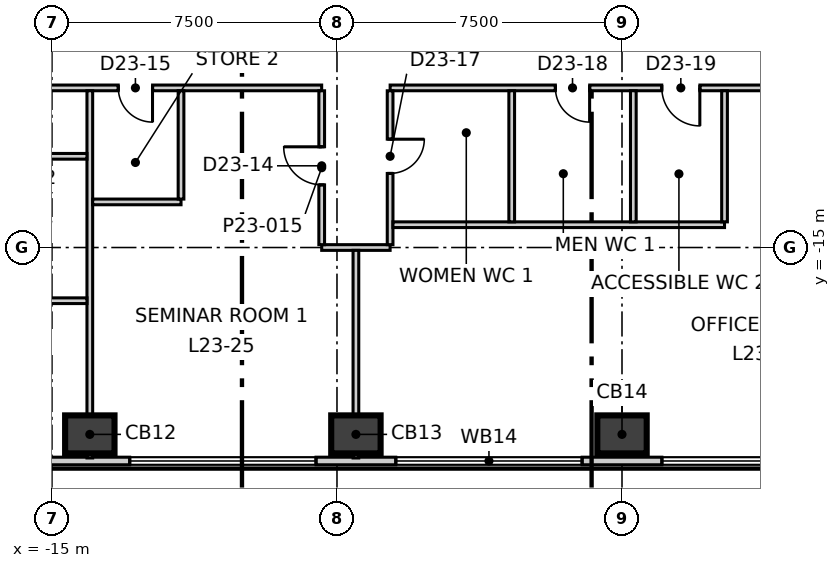
"""IFC4 building model, lengths in metres.
Left out: names, types, materials, properties, quantities, classifications, styles, units other than length and angle.
Written with IfcOpenShell. Run it as: python <this file> out.ifc"""

import sys

from ifc_helpers import new_model, si_unit, direction, frame, frame_2d, origin, origin_2d, place, context, subcontext, project, spatial, rectangle, extrude, element, fill, save


model = new_model("IFC4")
c1 = context("Model", 3, precision=1e-05, world=origin(), true_north=direction((0.0, 1.0)))
c2 = subcontext(c1, "Body", "Model", "MODEL_VIEW")
j1 = project(units=[si_unit("LENGTHUNIT", "METRE"), si_unit("PLANEANGLEUNIT", "RADIAN")], contexts=[c1])
p1 = place(None, origin())
s1 = spatial("IfcSite", under=j1, at=p1, CompositionType="ELEMENT")
p2 = place(p1, origin())
s2 = spatial("IfcBuilding", under=s1, at=p2, CompositionType="ELEMENT")
p3 = place(p2, frame((0.0, 0.0, 104.3)))
s3 = spatial("IfcBuildingStorey", under=s2, at=p3, CompositionType="ELEMENT", Elevation=104.3)
for number, where, z_axis, x_axis in (
    (1, (-14.004, -19.917, -0.3), (0.0, 0.0, 1.0), (1.0, 0.0, 0.0)),
    (2, (-7.002, -19.917, -0.3), (0.0, 0.0, 1.0), (1.0, 0.0, 0.0)),
    (3, (0.0, -19.917, -0.3), (0.0, 0.0, 1.0), (1.0, 0.0, 0.0)),
):
    element("IfcColumn", number, at=place(p3, frame(where, z_axis=z_axis, x_axis=x_axis)), inside=s3, PredefinedType="COLUMN", context=c2, shape_type="SweptSolid", body=[
        extrude(rectangle(XDim=1.3, YDim=1.0, at=origin_2d()), origin(), (0.0, 0.0, 1.0), 4.0),
    ])
p4 = place(p3, frame((-3.2, 35.691, 0.0), z_axis=(0.0, 0.0, 1.0), x_axis=(-0.500010127185, -0.866019556773, 0.0)))
e4 = element("IfcWall", 4, at=p4, inside=s3, PredefinedType="ELEMENTEDWALL", context=c2, shape_type="SweptSolid", body=[
    extrude(rectangle(XDim=58.599, YDim=0.2, at=frame_2d((29.299, 0.0))), origin(), (0.0, 0.0, 1.0), 3.7),
])
p5 = place(p4, frame((2.353, 0.0, 0.9)))
e5 = element("IfcOpeningElement", 5, at=p5, cuts=e4, PredefinedType="OPENING", context=c2, shape_type="SweptSolid", body=[
    extrude(rectangle(XDim=4.9, YDim=2.5, at=frame_2d((2.45, 1.25))), frame((0.0, 0.11, 0.0), z_axis=(0.0, -1.0, 0.0), x_axis=(1.0, 0.0, 0.0)), (0.0, 0.0, 1.0), 0.22),
])
p6 = place(p4, frame((9.355, 0.0, 0.9)))
e6 = element("IfcOpeningElement", 6, at=p6, cuts=e4, PredefinedType="OPENING", context=c2, shape_type="SweptSolid", body=[
    extrude(rectangle(XDim=4.9, YDim=2.5, at=frame_2d((2.45, 1.25))), frame((0.0, 0.11, 0.0), z_axis=(0.0, -1.0, 0.0), x_axis=(1.0, 0.0, 0.0)), (0.0, 0.0, 1.0), 0.22),
])
p7 = place(p4, frame((16.357, 0.0, 0.9)))
e7 = element("IfcOpeningElement", 7, at=p7, cuts=e4, PredefinedType="OPENING", context=c2, shape_type="SweptSolid", body=[
    extrude(rectangle(XDim=4.9, YDim=2.5, at=frame_2d((2.45, 1.25))), frame((0.0, 0.11, 0.0), z_axis=(0.0, -1.0, 0.0), x_axis=(1.0, 0.0, 0.0)), (0.0, 0.0, 1.0), 0.22),
])
p8 = place(p4, frame((23.358, 0.0, 0.9)))
e8 = element("IfcOpeningElement", 8, at=p8, cuts=e4, PredefinedType="OPENING", context=c2, shape_type="SweptSolid", body=[
    extrude(rectangle(XDim=4.9, YDim=2.5, at=frame_2d((2.45, 1.25))), frame((0.0, 0.11, 0.0), z_axis=(0.0, -1.0, 0.0), x_axis=(1.0, 0.0, 0.0)), (0.0, 0.0, 1.0), 0.22),
])
p9 = place(p4, frame((30.36, 0.0, 0.9)))
e9 = element("IfcOpeningElement", 9, at=p9, cuts=e4, PredefinedType="OPENING", context=c2, shape_type="SweptSolid", body=[
    extrude(rectangle(XDim=4.9, YDim=2.5, at=frame_2d((2.45, 1.25))), frame((0.0, 0.11, 0.0), z_axis=(0.0, -1.0, 0.0), x_axis=(1.0, 0.0, 0.0)), (0.0, 0.0, 1.0), 0.22),
])
p10 = place(p4, frame((37.362, 0.0, 0.9)))
e10 = element("IfcOpeningElement", 10, at=p10, cuts=e4, PredefinedType="OPENING", context=c2, shape_type="SweptSolid", body=[
    extrude(rectangle(XDim=4.9, YDim=2.5, at=frame_2d((2.45, 1.25))), frame((0.0, 0.11, 0.0), z_axis=(0.0, -1.0, 0.0), x_axis=(1.0, 0.0, 0.0)), (0.0, 0.0, 1.0), 0.22),
])
p11 = place(p4, frame((44.363, 0.0, 0.9)))
e11 = element("IfcOpeningElement", 11, at=p11, cuts=e4, PredefinedType="OPENING", context=c2, shape_type="SweptSolid", body=[
    extrude(rectangle(XDim=4.9, YDim=2.5, at=frame_2d((2.45, 1.25))), frame((0.0, 0.11, 0.0), z_axis=(0.0, -1.0, 0.0), x_axis=(1.0, 0.0, 0.0)), (0.0, 0.0, 1.0), 0.22),
])
p12 = place(p4, frame((51.365, 0.0, 0.9)))
e12 = element("IfcOpeningElement", 12, at=p12, cuts=e4, PredefinedType="OPENING", context=c2, shape_type="SweptSolid", body=[
    extrude(rectangle(XDim=4.9, YDim=2.5, at=frame_2d((2.45, 1.25))), frame((0.0, 0.11, 0.0), z_axis=(0.0, -1.0, 0.0), x_axis=(1.0, 0.0, 0.0)), (0.0, 0.0, 1.0), 0.22),
])
p13 = place(p3, frame((-29.31, -20.617, 0.0), z_axis=(0.0, 0.0, 1.0), x_axis=(1.0, 0.0, 0.0)))
e13 = element("IfcWall", 13, at=p13, inside=s3, PredefinedType="ELEMENTEDWALL", context=c2, shape_type="SweptSolid", body=[
    extrude(rectangle(XDim=58.6, YDim=0.2, at=frame_2d((29.3, 0.0))), origin(), (0.0, 0.0, 1.0), 3.7),
])
p14 = place(p13, frame((2.354, 0.0, 0.9)))
e14 = element("IfcOpeningElement", 14, at=p14, cuts=e13, PredefinedType="OPENING", context=c2, shape_type="SweptSolid", body=[
    extrude(rectangle(XDim=4.9, YDim=2.5, at=frame_2d((2.45, 1.25))), frame((0.0, 0.11, 0.0), z_axis=(0.0, -1.0, 0.0), x_axis=(1.0, 0.0, 0.0)), (0.0, 0.0, 1.0), 0.22),
])
p15 = place(p13, frame((9.356, 0.0, 0.9)))
e15 = element("IfcOpeningElement", 15, at=p15, cuts=e13, PredefinedType="OPENING", context=c2, shape_type="SweptSolid", body=[
    extrude(rectangle(XDim=4.9, YDim=2.5, at=frame_2d((2.45, 1.25))), frame((0.0, 0.11, 0.0), z_axis=(0.0, -1.0, 0.0), x_axis=(1.0, 0.0, 0.0)), (0.0, 0.0, 1.0), 0.22),
])
p16 = place(p13, frame((16.357, 0.0, 0.9)))
e16 = element("IfcOpeningElement", 16, at=p16, cuts=e13, PredefinedType="OPENING", context=c2, shape_type="SweptSolid", body=[
    extrude(rectangle(XDim=4.9, YDim=2.5, at=frame_2d((2.45, 1.25))), frame((0.0, 0.11, 0.0), z_axis=(0.0, -1.0, 0.0), x_axis=(1.0, 0.0, 0.0)), (0.0, 0.0, 1.0), 0.22),
])
p17 = place(p13, frame((23.359, 0.0, 0.9)))
e17 = element("IfcOpeningElement", 17, at=p17, cuts=e13, PredefinedType="OPENING", context=c2, shape_type="SweptSolid", body=[
    extrude(rectangle(XDim=4.9, YDim=2.5, at=frame_2d((2.45, 1.25))), frame((0.0, 0.11, 0.0), z_axis=(0.0, -1.0, 0.0), x_axis=(1.0, 0.0, 0.0)), (0.0, 0.0, 1.0), 0.22),
])
p18 = place(p13, frame((30.361, 0.0, 0.9)))
e18 = element("IfcOpeningElement", 18, at=p18, cuts=e13, PredefinedType="OPENING", context=c2, shape_type="SweptSolid", body=[
    extrude(rectangle(XDim=4.9, YDim=2.5, at=frame_2d((2.45, 1.25))), frame((0.0, 0.11, 0.0), z_axis=(0.0, -1.0, 0.0), x_axis=(1.0, 0.0, 0.0)), (0.0, 0.0, 1.0), 0.22),
])
p19 = place(p13, frame((37.363, 0.0, 0.9)))
e19 = element("IfcOpeningElement", 19, at=p19, cuts=e13, PredefinedType="OPENING", context=c2, shape_type="SweptSolid", body=[
    extrude(rectangle(XDim=4.9, YDim=2.5, at=frame_2d((2.45, 1.25))), frame((0.0, 0.11, 0.0), z_axis=(0.0, -1.0, 0.0), x_axis=(1.0, 0.0, 0.0)), (0.0, 0.0, 1.0), 0.22),
])
p20 = place(p13, frame((44.364, 0.0, 0.9)))
e20 = element("IfcOpeningElement", 20, at=p20, cuts=e13, PredefinedType="OPENING", context=c2, shape_type="SweptSolid", body=[
    extrude(rectangle(XDim=4.9, YDim=2.5, at=frame_2d((2.45, 1.25))), frame((0.0, 0.11, 0.0), z_axis=(0.0, -1.0, 0.0), x_axis=(1.0, 0.0, 0.0)), (0.0, 0.0, 1.0), 0.22),
])
p21 = place(p13, frame((51.366, 0.0, 0.9)))
e21 = element("IfcOpeningElement", 21, at=p21, cuts=e13, PredefinedType="OPENING", context=c2, shape_type="SweptSolid", body=[
    extrude(rectangle(XDim=4.9, YDim=2.5, at=frame_2d((2.45, 1.25))), frame((0.0, 0.11, 0.0), z_axis=(0.0, -1.0, 0.0), x_axis=(1.0, 0.0, 0.0)), (0.0, 0.0, 1.0), 0.22),
])
p22 = place(p3, frame((32.51, -15.074, 0.0), z_axis=(0.0, 0.0, 1.0), x_axis=(-0.500008323105, 0.866020598384, 0.0)))
e22 = element("IfcWall", 22, at=p22, inside=s3, PredefinedType="ELEMENTEDWALL", context=c2, shape_type="SweptSolid", body=[
    extrude(rectangle(XDim=58.599, YDim=0.2, at=frame_2d((29.3, 0.0))), origin(), (0.0, 0.0, 1.0), 3.7),
])
p23 = place(p22, frame((2.354, 0.0, 0.9)))
e23 = element("IfcOpeningElement", 23, at=p23, cuts=e22, PredefinedType="OPENING", context=c2, shape_type="SweptSolid", body=[
    extrude(rectangle(XDim=4.9, YDim=2.5, at=frame_2d((2.45, 1.25))), frame((0.0, 0.11, 0.0), z_axis=(0.0, -1.0, 0.0), x_axis=(1.0, 0.0, 0.0)), (0.0, 0.0, 1.0), 0.22),
])
p24 = place(p22, frame((9.355, 0.0, 0.9)))
e24 = element("IfcOpeningElement", 24, at=p24, cuts=e22, PredefinedType="OPENING", context=c2, shape_type="SweptSolid", body=[
    extrude(rectangle(XDim=4.9, YDim=2.5, at=frame_2d((2.45, 1.25))), frame((0.0, 0.11, 0.0), z_axis=(0.0, -1.0, 0.0), x_axis=(1.0, 0.0, 0.0)), (0.0, 0.0, 1.0), 0.22),
])
p25 = place(p22, frame((16.357, 0.0, 0.9)))
e25 = element("IfcOpeningElement", 25, at=p25, cuts=e22, PredefinedType="OPENING", context=c2, shape_type="SweptSolid", body=[
    extrude(rectangle(XDim=4.9, YDim=2.5, at=frame_2d((2.45, 1.25))), frame((0.0, 0.11, 0.0), z_axis=(0.0, -1.0, 0.0), x_axis=(1.0, 0.0, 0.0)), (0.0, 0.0, 1.0), 0.22),
])
p26 = place(p22, frame((23.359, 0.0, 0.9)))
e26 = element("IfcOpeningElement", 26, at=p26, cuts=e22, PredefinedType="OPENING", context=c2, shape_type="SweptSolid", body=[
    extrude(rectangle(XDim=4.9, YDim=2.5, at=frame_2d((2.45, 1.25))), frame((0.0, 0.11, 0.0), z_axis=(0.0, -1.0, 0.0), x_axis=(1.0, 0.0, 0.0)), (0.0, 0.0, 1.0), 0.22),
])
p27 = place(p22, frame((30.36, 0.0, 0.9)))
e27 = element("IfcOpeningElement", 27, at=p27, cuts=e22, PredefinedType="OPENING", context=c2, shape_type="SweptSolid", body=[
    extrude(rectangle(XDim=4.9, YDim=2.5, at=frame_2d((2.45, 1.25))), frame((0.0, 0.11, 0.0), z_axis=(0.0, -1.0, 0.0), x_axis=(1.0, 0.0, 0.0)), (0.0, 0.0, 1.0), 0.22),
])
p28 = place(p22, frame((37.362, 0.0, 0.9)))
e28 = element("IfcOpeningElement", 28, at=p28, cuts=e22, PredefinedType="OPENING", context=c2, shape_type="SweptSolid", body=[
    extrude(rectangle(XDim=4.9, YDim=2.5, at=frame_2d((2.45, 1.25))), frame((0.0, 0.11, 0.0), z_axis=(0.0, -1.0, 0.0), x_axis=(1.0, 0.0, 0.0)), (0.0, 0.0, 1.0), 0.22),
])
p29 = place(p22, frame((44.364, 0.0, 0.9)))
e29 = element("IfcOpeningElement", 29, at=p29, cuts=e22, PredefinedType="OPENING", context=c2, shape_type="SweptSolid", body=[
    extrude(rectangle(XDim=4.9, YDim=2.5, at=frame_2d((2.45, 1.25))), frame((0.0, 0.11, 0.0), z_axis=(0.0, -1.0, 0.0), x_axis=(1.0, 0.0, 0.0)), (0.0, 0.0, 1.0), 0.22),
])
p30 = place(p22, frame((51.365, 0.0, 0.9)))
e30 = element("IfcOpeningElement", 30, at=p30, cuts=e22, PredefinedType="OPENING", context=c2, shape_type="SweptSolid", body=[
    extrude(rectangle(XDim=4.9, YDim=2.5, at=frame_2d((2.45, 1.25))), frame((0.0, 0.11, 0.0), z_axis=(0.0, -1.0, 0.0), x_axis=(1.0, 0.0, 0.0)), (0.0, 0.0, 1.0), 0.22),
])
p31 = place(p3, frame((-18.556, -10.8, 0.0), z_axis=(0.0, 0.0, 1.0), x_axis=(1.0, 0.0, 0.0)))
e31 = element("IfcWall", 31, at=p31, inside=s3, PredefinedType="PARTITIONING", context=c2, shape_type="SweptSolid", body=[
    extrude(rectangle(XDim=10.653, YDim=0.15, at=frame_2d((5.326, 0.0))), origin(), (0.0, 0.0, 1.0), 3.7),
])
p32 = place(p31, frame((1.7, 0.0, 0.0)))
e32 = element("IfcOpeningElement", 32, at=p32, cuts=e31, PredefinedType="OPENING", context=c2, shape_type="SweptSolid", body=[
    extrude(rectangle(XDim=1.1, YDim=2.1, at=frame_2d((0.55, 1.05))), frame((0.0, 0.085, 0.0), z_axis=(0.0, -1.0, 0.0), x_axis=(1.0, 0.0, 0.0)), (0.0, 0.0, 1.0), 0.17),
])
p33 = place(p31, frame((5.302, 0.0, 0.0)))
e33 = element("IfcOpeningElement", 33, at=p33, cuts=e31, PredefinedType="OPENING", context=c2, shape_type="SweptSolid", body=[
    extrude(rectangle(XDim=0.9, YDim=2.1, at=frame_2d((0.45, 1.05))), frame((0.0, 0.085, 0.0), z_axis=(0.0, -1.0, 0.0), x_axis=(1.0, 0.0, 0.0)), (0.0, 0.0, 1.0), 0.17),
])
p34 = place(p3, frame((-6.101, -10.8, 0.0), z_axis=(0.0, 0.0, 1.0), x_axis=(1.0, 0.0, 0.0)))
e34 = element("IfcWall", 34, at=p34, inside=s3, PredefinedType="PARTITIONING", context=c2, shape_type="SweptSolid", body=[
    extrude(rectangle(XDim=24.807, YDim=0.15, at=frame_2d((12.404, 0.0))), origin(), (0.0, 0.0, 1.0), 3.7),
])
p35 = place(p34, frame((10.449, 0.0, 0.0)))
e35 = element("IfcOpeningElement", 35, at=p35, cuts=e34, PredefinedType="OPENING", context=c2, shape_type="SweptSolid", body=[
    extrude(rectangle(XDim=1.1, YDim=2.1, at=frame_2d((0.55, 1.05))), frame((0.0, 0.085, 0.0), z_axis=(0.0, -1.0, 0.0), x_axis=(1.0, 0.0, 0.0)), (0.0, 0.0, 1.0), 0.17),
])
p36 = place(p34, frame((4.349, 0.0, 0.0)))
e36 = element("IfcOpeningElement", 36, at=p36, cuts=e34, PredefinedType="OPENING", context=c2, shape_type="SweptSolid", body=[
    extrude(rectangle(XDim=0.9, YDim=2.1, at=frame_2d((0.45, 1.05))), frame((0.0, 0.085, 0.0), z_axis=(0.0, -1.0, 0.0), x_axis=(1.0, 0.0, 0.0)), (0.0, 0.0, 1.0), 0.17),
])
p37 = place(p34, frame((7.149, 0.0, 0.0)))
e37 = element("IfcOpeningElement", 37, at=p37, cuts=e34, PredefinedType="OPENING", context=c2, shape_type="SweptSolid", body=[
    extrude(rectangle(XDim=1.0, YDim=2.1, at=frame_2d((0.5, 1.05))), frame((0.0, 0.085, 0.0), z_axis=(0.0, -1.0, 0.0), x_axis=(1.0, 0.0, 0.0)), (0.0, 0.0, 1.0), 0.17),
])
p38 = place(p34, frame((18.453, 0.0, 0.0)))
e38 = element("IfcOpeningElement", 38, at=p38, cuts=e34, PredefinedType="OPENING", context=c2, shape_type="SweptSolid", body=[
    extrude(rectangle(XDim=1.1, YDim=2.1, at=frame_2d((0.55, 1.05))), frame((0.0, 0.085, 0.0), z_axis=(0.0, -1.0, 0.0), x_axis=(1.0, 0.0, 0.0)), (0.0, 0.0, 1.0), 0.17),
])
p39 = place(p3, frame((-18.631, -10.669, 0.0), z_axis=(0.0, 0.0, 1.0), x_axis=(0.500015596868, 0.866016398741, 0.0)))
e39 = element("IfcWall", 39, at=p39, inside=s3, PredefinedType="PARTITIONING", context=c2, shape_type="SweptSolid", body=[
    extrude(rectangle(XDim=24.656, YDim=0.15, at=frame_2d((12.328, 0.0))), origin(), (0.0, 0.0, 1.0), 3.7),
])
p40 = place(p39, frame((17.507, 0.0, 0.0)))
e40 = element("IfcOpeningElement", 40, at=p40, cuts=e39, PredefinedType="OPENING", context=c2, shape_type="SweptSolid", body=[
    extrude(rectangle(XDim=1.1, YDim=2.1, at=frame_2d((0.55, 1.05))), frame((0.0, 0.085, 0.0), z_axis=(0.0, -1.0, 0.0), x_axis=(1.0, 0.0, 0.0)), (0.0, 0.0, 1.0), 0.17),
])
p41 = place(p39, frame((5.104, 0.0, 0.0)))
e41 = element("IfcOpeningElement", 41, at=p41, cuts=e39, PredefinedType="OPENING", context=c2, shape_type="SweptSolid", body=[
    extrude(rectangle(XDim=1.1, YDim=2.1, at=frame_2d((0.55, 1.05))), frame((0.0, 0.085, 0.0), z_axis=(0.0, -1.0, 0.0), x_axis=(1.0, 0.0, 0.0)), (0.0, 0.0, 1.0), 0.17),
])
p42 = place(p3, frame((-14.004, -20.537, 0.0), z_axis=(0.0, 0.0, 1.0), x_axis=(0.0, 1.0, 0.0)))
e42 = element("IfcWall", 42, at=p42, inside=s3, PredefinedType="PARTITIONING", context=c2, shape_type="SweptSolid", body=[
    extrude(rectangle(XDim=9.662, YDim=0.15, at=frame_2d((4.831, 0.0))), origin(), (0.0, 0.0, 1.0), 3.7),
])
p43 = place(p3, frame((-13.929, -13.8, 0.0), z_axis=(0.0, 0.0, 1.0), x_axis=(1.0, 0.0, 0.0)))
e43 = element("IfcWall", 43, at=p43, inside=s3, PredefinedType="PARTITIONING", context=c2, shape_type="SweptSolid", body=[
    extrude(rectangle(XDim=2.325, YDim=0.15, at=frame_2d((1.163, 0.0))), origin(), (0.0, 0.0, 1.0), 3.7),
])
p44 = place(p3, frame((-11.604, -13.725, 0.0), z_axis=(0.0, 0.0, 1.0), x_axis=(0.0, 1.0, 0.0)))
e44 = element("IfcWall", 44, at=p44, inside=s3, PredefinedType="PARTITIONING", context=c2, shape_type="SweptSolid", body=[
    extrude(rectangle(XDim=2.85, YDim=0.15, at=frame_2d((1.425, 0.0))), origin(), (0.0, 0.0, 1.0), 3.7),
])
p45 = place(p3, frame((-7.902, -15.0, 0.0), z_axis=(0.0, 0.0, 1.0), x_axis=(1.0, 0.0, 0.0)))
e45 = element("IfcWall", 45, at=p45, inside=s3, PredefinedType="PARTITIONING", context=c2, shape_type="SweptSolid", body=[
    extrude(rectangle(XDim=1.8, YDim=0.15, at=frame_2d((0.9, 0.0))), origin(), (0.0, 0.0, 1.0), 3.7),
])
p46 = place(p3, frame((-7.902, -14.925, 0.0), z_axis=(0.0, 0.0, 1.0), x_axis=(0.0, 1.0, 0.0)))
e46 = element("IfcWall", 46, at=p46, inside=s3, PredefinedType="PARTITIONING", context=c2, shape_type="SweptSolid", body=[
    extrude(rectangle(XDim=4.049, YDim=0.15, at=frame_2d((2.024, 0.0))), origin(), (0.0, 0.0, 1.0), 3.7),
])
p47 = place(p46, frame((1.575, 0.0, 0.0)))
e47 = element("IfcOpeningElement", 47, at=p47, cuts=e46, PredefinedType="OPENING", context=c2, shape_type="SweptSolid", body=[
    extrude(rectangle(XDim=1.0, YDim=2.1, at=frame_2d((0.5, 1.05))), frame((0.0, 0.085, 0.0), z_axis=(0.0, -1.0, 0.0), x_axis=(1.0, 0.0, 0.0)), (0.0, 0.0, 1.0), 0.17),
])
p48 = place(p3, frame((-7.002, -20.537, 0.0), z_axis=(0.0, 0.0, 1.0), x_axis=(0.0, 1.0, 0.0)))
e48 = element("IfcWall", 48, at=p48, inside=s3, PredefinedType="PARTITIONING", context=c2, shape_type="SweptSolid", body=[
    extrude(rectangle(XDim=5.462, YDim=0.15, at=frame_2d((2.731, 0.0))), origin(), (0.0, 0.0, 1.0), 3.7),
])
p49 = place(p3, frame((-6.102, -14.925, 0.0), z_axis=(0.0, 0.0, 1.0), x_axis=(0.0, 1.0, 0.0)))
e49 = element("IfcWall", 49, at=p49, inside=s3, PredefinedType="PARTITIONING", context=c2, shape_type="SweptSolid", body=[
    extrude(rectangle(XDim=4.049, YDim=0.15, at=frame_2d((2.024, 0.0))), origin(), (0.0, 0.0, 1.0), 3.7),
])
p50 = place(p49, frame((1.875, 0.0, 0.0)))
e50 = element("IfcOpeningElement", 50, at=p50, cuts=e49, PredefinedType="OPENING", context=c2, shape_type="SweptSolid", body=[
    extrude(rectangle(XDim=0.9, YDim=2.1, at=frame_2d((0.45, 1.05))), frame((0.0, 0.085, 0.0), z_axis=(0.0, -1.0, 0.0), x_axis=(1.0, 0.0, 0.0)), (0.0, 0.0, 1.0), 0.17),
])
p51 = place(p3, frame((-6.027, -14.4, 0.0), z_axis=(0.0, 0.0, 1.0), x_axis=(1.0, 0.0, 0.0)))
e51 = element("IfcWall", 51, at=p51, inside=s3, PredefinedType="PARTITIONING", context=c2, shape_type="SweptSolid", body=[
    extrude(rectangle(XDim=8.725, YDim=0.15, at=frame_2d((4.363, 0.0))), origin(), (0.0, 0.0, 1.0), 3.7),
])
for number, where, z_axis, x_axis in (
    (52, (-2.902, -14.325, 0.0), (0.0, 0.0, 1.0), (0.0, 1.0, 0.0)),
    (53, (2.698, -14.325, 0.0), (0.0, 0.0, 1.0), (0.0, 1.0, 0.0)),
):
    element("IfcWall", number, at=place(p3, frame(where, z_axis=z_axis, x_axis=x_axis)), inside=s3, PredefinedType="PARTITIONING", context=c2, shape_type="SweptSolid", body=[
        extrude(rectangle(XDim=3.45, YDim=0.15, at=frame_2d((1.725, 0.0))), origin(), (0.0, 0.0, 1.0), 3.7),
    ])
p52 = place(p3, frame((0.298, -14.325, 0.0), z_axis=(0.0, 0.0, 1.0), x_axis=(0.0, 1.0, 0.0)))
e54 = element("IfcWall", 54, at=p52, inside=s3, PredefinedType="PARTITIONING", context=c2, shape_type="SweptSolid", body=[
    extrude(rectangle(XDim=3.45, YDim=0.15, at=frame_2d((1.725, 0.0))), origin(), (0.0, 0.0, 1.0), 3.2),
])
p53 = place(p3, frame((-19.804, -12.6, 0.0), z_axis=(0.0, 0.0, 1.0), x_axis=(1.0, 0.0, 0.0)))
e55 = element("IfcWall", 55, at=p53, inside=s3, PredefinedType="PARTITIONING", context=c2, shape_type="SweptSolid", body=[
    extrude(rectangle(XDim=5.725, YDim=0.15, at=frame_2d((2.862, 0.0))), origin(), (0.0, 0.0, 1.0), 3.7),
])
p54 = place(p53, frame((3.55, 0.0, 0.0)))
e56 = element("IfcOpeningElement", 56, at=p54, cuts=e55, PredefinedType="OPENING", context=c2, shape_type="SweptSolid", body=[
    extrude(rectangle(XDim=0.9, YDim=2.1, at=frame_2d((0.45, 1.05))), frame((0.0, 0.085, 0.0), z_axis=(0.0, -1.0, 0.0), x_axis=(1.0, 0.0, 0.0)), (0.0, 0.0, 1.0), 0.17),
])
p55 = place(p3, frame((-17.529, -16.4, 0.0), z_axis=(0.0, 0.0, 1.0), x_axis=(1.0, 0.0, 0.0)))
e57 = element("IfcWall", 57, at=p55, inside=s3, PredefinedType="PARTITIONING", context=c2, shape_type="SweptSolid", body=[
    extrude(rectangle(XDim=3.45, YDim=0.15, at=frame_2d((1.725, 0.0))), origin(), (0.0, 0.0, 1.0), 3.7),
])
p56 = place(p16, origin())
e58 = element("IfcWindow", 58, at=p56, inside=s3, PartitioningType="SINGLE_PANEL", PredefinedType="WINDOW", context=c2, shape_type="SweptSolid", body=[
    extrude(rectangle(XDim=4.9, YDim=2.5, at=frame_2d((2.45, 1.25))), frame((0.0, 0.03, 0.0), z_axis=(0.0, -1.0, 0.0), x_axis=(1.0, 0.0, 0.0)), (0.0, 0.0, 1.0), 0.06),
])
fill(e16, e58)
p57 = place(p17, origin())
e59 = element("IfcWindow", 59, at=p57, inside=s3, PartitioningType="SINGLE_PANEL", PredefinedType="WINDOW", context=c2, shape_type="SweptSolid", body=[
    extrude(rectangle(XDim=4.9, YDim=2.5, at=frame_2d((2.45, 1.25))), frame((0.0, 0.03, 0.0), z_axis=(0.0, -1.0, 0.0), x_axis=(1.0, 0.0, 0.0)), (0.0, 0.0, 1.0), 0.06),
])
fill(e17, e59)
p58 = place(p18, origin())
e60 = element("IfcWindow", 60, at=p58, inside=s3, PartitioningType="SINGLE_PANEL", PredefinedType="WINDOW", context=c2, shape_type="SweptSolid", body=[
    extrude(rectangle(XDim=4.9, YDim=2.5, at=frame_2d((2.45, 1.25))), frame((0.0, 0.03, 0.0), z_axis=(0.0, -1.0, 0.0), x_axis=(1.0, 0.0, 0.0)), (0.0, 0.0, 1.0), 0.06),
])
fill(e18, e60)
p59 = place(p47, origin())
e61 = element("IfcDoor", 61, at=p59, inside=s3, OperationType="SINGLE_SWING_LEFT", PredefinedType="DOOR", context=c2, shape_type="SweptSolid", body=[
    extrude(rectangle(XDim=1.0, YDim=2.1, at=frame_2d((0.5, 1.05))), frame((0.0, 0.025, 0.0), z_axis=(0.0, -1.0, 0.0), x_axis=(1.0, 0.0, 0.0)), (0.0, 0.0, 1.0), 0.05),
])
fill(e47, e61)
p60 = place(p33, origin())
e62 = element("IfcDoor", 62, at=p60, inside=s3, OperationType="SINGLE_SWING_RIGHT", PredefinedType="DOOR", context=c2, shape_type="SweptSolid", body=[
    extrude(rectangle(XDim=0.9, YDim=2.1, at=frame_2d((0.45, 1.05))), frame((0.0, 0.025, 0.0), z_axis=(0.0, -1.0, 0.0), x_axis=(1.0, 0.0, 0.0)), (0.0, 0.0, 1.0), 0.05),
])
fill(e33, e62)
p61 = place(p50, origin())
e63 = element("IfcDoor", 63, at=p61, inside=s3, OperationType="SINGLE_SWING_RIGHT", PredefinedType="DOOR", context=c2, shape_type="SweptSolid", body=[
    extrude(rectangle(XDim=0.9, YDim=2.1, at=frame_2d((0.45, 1.05))), frame((0.0, 0.025, 0.0), z_axis=(0.0, -1.0, 0.0), x_axis=(1.0, 0.0, 0.0)), (0.0, 0.0, 1.0), 0.05),
])
fill(e50, e63)
p62 = place(p36, origin())
e64 = element("IfcDoor", 64, at=p62, inside=s3, OperationType="SINGLE_SWING_RIGHT", PredefinedType="DOOR", context=c2, shape_type="SweptSolid", body=[
    extrude(rectangle(XDim=0.9, YDim=2.1, at=frame_2d((0.45, 1.05))), frame((0.0, 0.025, 0.0), z_axis=(0.0, -1.0, 0.0), x_axis=(1.0, 0.0, 0.0)), (0.0, 0.0, 1.0), 0.05),
])
fill(e36, e64)
p63 = place(p37, origin())
e65 = element("IfcDoor", 65, at=p63, inside=s3, OperationType="SINGLE_SWING_RIGHT", PredefinedType="DOOR", context=c2, shape_type="SweptSolid", body=[
    extrude(rectangle(XDim=1.0, YDim=2.1, at=frame_2d((0.5, 1.05))), frame((0.0, 0.025, 0.0), z_axis=(0.0, -1.0, 0.0), x_axis=(1.0, 0.0, 0.0)), (0.0, 0.0, 1.0), 0.05),
])
fill(e37, e65)
save(model, sys.argv[1])
